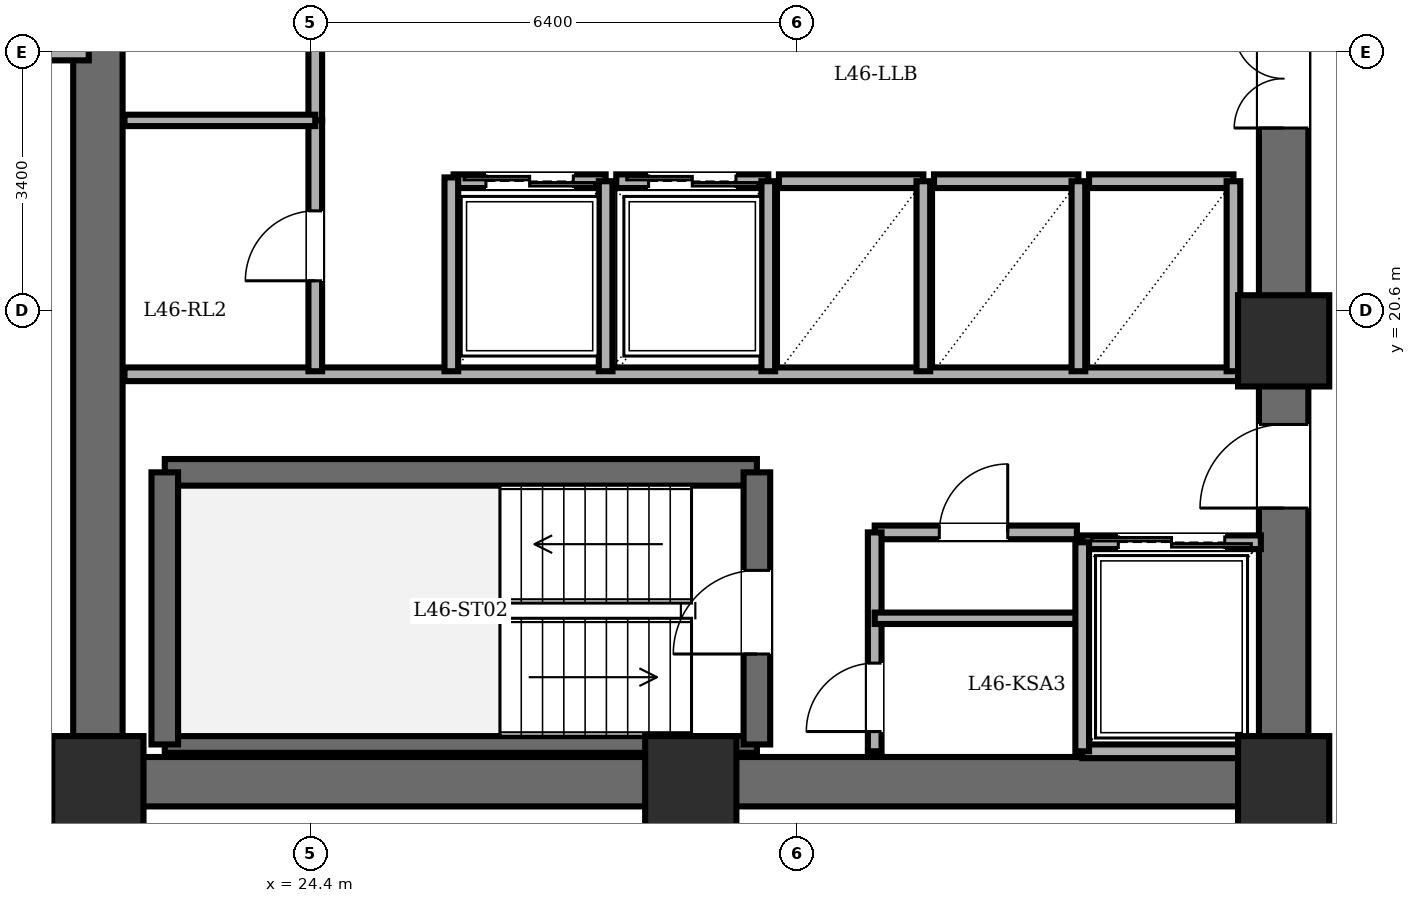
"""IFC4 building model, lengths in metres.
Left out: names, types, materials, properties, quantities, classifications, styles, units other than length and angle.
Written with IfcOpenShell. Run it as: python <this file> out.ifc"""

import sys

from ifc_helpers import new_model, si_unit, direction, frame, frame_2d, origin, origin_2d, place, context, subcontext, project, spatial, rectangle, extrude, element, fill, save


model = new_model("IFC4")
c1 = context("Model", 3, precision=1e-05, world=origin(), true_north=direction((0.0, 1.0)))
c2 = subcontext(c1, "Body", "Model", "MODEL_VIEW")
j1 = project(units=[si_unit("LENGTHUNIT", "METRE"), si_unit("PLANEANGLEUNIT", "RADIAN")], contexts=[c1])
p1 = place(None, origin())
s1 = spatial("IfcSite", under=j1, at=p1, CompositionType="ELEMENT")
p2 = place(p1, origin())
s2 = spatial("IfcBuilding", under=s1, at=p2, CompositionType="ELEMENT")
p3 = place(p2, frame((0.0, 0.0, 176.2)))
s3 = spatial("IfcBuildingStorey", under=s2, at=p3, CompositionType="ELEMENT", Elevation=176.2)
for number, where, z_axis, x_axis in (
    (1, (21.6, 14.4, 0.0), (0.0, 0.0, 1.0), (1.0, 0.0, 0.0)),
    (2, (29.4, 14.4, 0.0), (0.0, 0.0, 1.0), (1.0, 0.0, 0.0)),
    (3, (37.2, 14.4, 0.0), (0.0, 0.0, 1.0), (1.0, 0.0, 0.0)),
    (4, (37.2, 20.2, 0.0), (0.0, 0.0, 1.0), (1.0, 0.0, 0.0)),
):
    element("IfcColumn", number, at=place(p3, frame(where, z_axis=z_axis, x_axis=x_axis)), inside=s3, PredefinedType="COLUMN", context=c2, shape_type="SweptSolid", body=[
        extrude(rectangle(XDim=1.2, YDim=1.2, at=origin_2d()), origin(), (0.0, 0.0, 1.0), 3.6),
    ])
p4 = place(p3, frame((21.6, 14.4, 0.0), z_axis=(0.0, 0.0, 1.0), x_axis=(0.0, 1.0, 0.0)))
e5 = element("IfcWall", 5, at=p4, inside=s3, PredefinedType="SHEAR", context=c2, shape_type="SweptSolid", body=[
    extrude(rectangle(XDim=19.2, YDim=0.65, at=frame_2d((9.6, 0.0))), origin(), (0.0, 0.0, 1.0), 3.4),
])
p5 = place(p3, frame((37.2, 14.4, 0.0), z_axis=(0.0, 0.0, 1.0), x_axis=(-1.0, 0.0, 0.0)))
e6 = element("IfcWall", 6, at=p5, inside=s3, PredefinedType="SHEAR", context=c2, shape_type="SweptSolid", body=[
    extrude(rectangle(XDim=15.6, YDim=0.65, at=frame_2d((7.8, 0.0))), origin(), (0.0, 0.0, 1.0), 3.4),
])
p6 = place(p3, frame((37.2, 14.4, 0.0), z_axis=(0.0, 0.0, 1.0), x_axis=(0.0, 1.0, 0.0)))
e7 = element("IfcWall", 7, at=p6, inside=s3, PredefinedType="SHEAR", context=c2, shape_type="SweptSolid", body=[
    extrude(rectangle(XDim=19.2, YDim=0.65, at=frame_2d((9.6, 0.0))), origin(), (0.0, 0.0, 1.0), 3.4),
])
p7 = place(p6, frame((15.8, 0.0, 0.0)))
e8 = element("IfcOpeningElement", 8, at=p7, cuts=e7, PredefinedType="OPENING", context=c2, shape_type="SweptSolid", body=[
    extrude(rectangle(XDim=1.15, YDim=2.15, at=frame_2d((0.575, 1.075))), frame((0.0, 0.335, 0.0), z_axis=(0.0, -1.0, 0.0), x_axis=(1.0, 0.0, 0.0)), (0.0, 0.0, 1.0), 0.67),
])
p8 = place(p6, frame((3.6, 0.0, 0.0)))
e9 = element("IfcOpeningElement", 9, at=p8, cuts=e7, PredefinedType="OPENING", context=c2, shape_type="SweptSolid", body=[
    extrude(rectangle(XDim=1.1, YDim=2.15, at=frame_2d((0.55, 1.075))), frame((0.0, 0.335, 0.0), z_axis=(0.0, -1.0, 0.0), x_axis=(1.0, 0.0, 0.0)), (0.0, 0.0, 1.0), 0.67),
])
p9 = place(p6, frame((8.6, 0.0, 0.0)))
e10 = element("IfcOpeningElement", 10, at=p9, cuts=e7, PredefinedType="OPENING", context=c2, shape_type="SweptSolid", body=[
    extrude(rectangle(XDim=1.3, YDim=2.2, at=frame_2d((0.65, 1.1))), frame((0.0, 0.335, 0.0), z_axis=(0.0, -1.0, 0.0), x_axis=(1.0, 0.0, 0.0)), (0.0, 0.0, 1.0), 0.67),
])
p10 = place(p3, frame((22.48, 18.47, 0.0), z_axis=(0.0, 0.0, 1.0), x_axis=(1.0, 0.0, 0.0)))
e11 = element("IfcWall", 11, at=p10, inside=s3, PredefinedType="SOLIDWALL", context=c2, shape_type="SweptSolid", body=[
    extrude(rectangle(XDim=7.79, YDim=0.35, at=frame_2d((3.895, 0.0))), origin(), (0.0, 0.0, 1.0), 3.4),
])
p11 = place(p3, frame((22.48, 14.89, 0.0), z_axis=(0.0, 0.0, 1.0), x_axis=(1.0, 0.0, 0.0)))
e12 = element("IfcWall", 12, at=p11, inside=s3, PredefinedType="PARTITIONING", context=c2, shape_type="SweptSolid", body=[
    extrude(rectangle(XDim=7.79, YDim=0.22, at=frame_2d((3.895, 0.0))), origin(), (0.0, 0.0, 1.0), 3.4),
])
p12 = place(p3, frame((22.48, 14.89, 0.0), z_axis=(0.0, 0.0, 1.0), x_axis=(0.0, 1.0, 0.0)))
e13 = element("IfcWall", 13, at=p12, inside=s3, PredefinedType="SOLIDWALL", context=c2, shape_type="SweptSolid", body=[
    extrude(rectangle(XDim=3.58, YDim=0.35, at=frame_2d((1.79, 0.0))), origin(), (0.0, 0.0, 1.0), 3.4),
])
p13 = place(p3, frame((30.27, 14.89, 0.0), z_axis=(0.0, 0.0, 1.0), x_axis=(0.0, 1.0, 0.0)))
e14 = element("IfcWall", 14, at=p13, inside=s3, PredefinedType="SOLIDWALL", context=c2, shape_type="SweptSolid", body=[
    extrude(rectangle(XDim=3.58, YDim=0.35, at=frame_2d((1.79, 0.0))), origin(), (0.0, 0.0, 1.0), 3.4),
])
p14 = place(p13, frame((1.19, 0.0, 0.0)))
e15 = element("IfcOpeningElement", 15, at=p14, cuts=e14, PredefinedType="OPENING", context=c2, shape_type="SweptSolid", body=[
    extrude(rectangle(XDim=1.1, YDim=2.15, at=frame_2d((0.55, 1.075))), frame((0.0, 0.185, 0.0), z_axis=(0.0, -1.0, 0.0), x_axis=(1.0, 0.0, 0.0)), (0.0, 0.0, 1.0), 0.37),
])
p15 = place(p3, frame((21.95, 19.76, 0.0), z_axis=(0.0, 0.0, 1.0), x_axis=(1.0, 0.0, 0.0)))
e16 = element("IfcWall", 16, at=p15, inside=s3, PredefinedType="PARTITIONING", context=c2, shape_type="SweptSolid", body=[
    extrude(rectangle(XDim=14.87, YDim=0.18, at=frame_2d((7.435, 0.0))), origin(), (0.0, 0.0, 1.0), 3.4),
])
p16 = place(p3, frame((31.82, 17.68, 0.0), z_axis=(0.0, 0.0, 1.0), x_axis=(1.0, 0.0, 0.0)))
e17 = element("IfcWall", 17, at=p16, inside=s3, PredefinedType="PARTITIONING", context=c2, shape_type="SweptSolid", body=[
    extrude(rectangle(XDim=2.66, YDim=0.18, at=frame_2d((1.33, 0.0))), origin(), (0.0, 0.0, 1.0), 3.4),
])
p17 = place(p16, frame((0.85, 0.0, 0.0)))
e18 = element("IfcOpeningElement", 18, at=p17, cuts=e17, PredefinedType="OPENING", context=c2, shape_type="SweptSolid", body=[
    extrude(rectangle(XDim=0.9, YDim=2.05, at=frame_2d((0.45, 1.025))), frame((0.0, 0.1, 0.0), z_axis=(0.0, -1.0, 0.0), x_axis=(1.0, 0.0, 0.0)), (0.0, 0.0, 1.0), 0.2),
])
p18 = place(p3, frame((31.82, 14.8, 0.0), z_axis=(0.0, 0.0, 1.0), x_axis=(0.0, 1.0, 0.0)))
e19 = element("IfcWall", 19, at=p18, inside=s3, PredefinedType="PARTITIONING", context=c2, shape_type="SweptSolid", body=[
    extrude(rectangle(XDim=2.88, YDim=0.18, at=frame_2d((1.44, 0.0))), origin(), (0.0, 0.0, 1.0), 3.4),
])
p19 = place(p18, frame((0.26, 0.0, 0.0)))
e20 = element("IfcOpeningElement", 20, at=p19, cuts=e19, PredefinedType="OPENING", context=c2, shape_type="SweptSolid", body=[
    extrude(rectangle(XDim=0.9, YDim=2.05, at=frame_2d((0.45, 1.025))), frame((0.0, 0.1, 0.0), z_axis=(0.0, -1.0, 0.0), x_axis=(1.0, 0.0, 0.0)), (0.0, 0.0, 1.0), 0.2),
])
p20 = place(p3, frame((31.82, 16.55, 0.0), z_axis=(0.0, 0.0, 1.0), x_axis=(1.0, 0.0, 0.0)))
e21 = element("IfcWall", 21, at=p20, inside=s3, PredefinedType="PARTITIONING", context=c2, shape_type="SweptSolid", body=[
    extrude(rectangle(XDim=2.66, YDim=0.15, at=frame_2d((1.33, 0.0))), origin(), (0.0, 0.0, 1.0), 3.4),
])
p21 = place(p3, frame((34.55, 17.55, 0.0), z_axis=(0.0, 0.0, 1.0), x_axis=(1.0, 0.0, 0.0)))
e22 = element("IfcWall", 22, at=p21, inside=s3, PredefinedType="PARTITIONING", context=c2, shape_type="SweptSolid", body=[
    extrude(rectangle(XDim=2.35, YDim=0.18, at=frame_2d((1.175, 0.0))), origin(), (0.0, 0.0, 1.0), 3.4),
])
p22 = place(p21, frame((0.475, 0.0, 0.0)))
e23 = element("IfcOpeningElement", 23, at=p22, cuts=e22, PredefinedType="OPENING", context=c2, shape_type="SweptSolid", body=[
    extrude(rectangle(XDim=1.4, YDim=2.3, at=frame_2d((0.7, 1.15))), frame((0.0, 0.1, 0.0), z_axis=(0.0, -1.0, 0.0), x_axis=(1.0, 0.0, 0.0)), (0.0, 0.0, 1.0), 0.2),
])
p23 = place(p3, frame((36.9, 14.8, 0.0), z_axis=(0.0, 0.0, 1.0), x_axis=(-1.0, 0.0, 0.0)))
e24 = element("IfcWall", 24, at=p23, inside=s3, PredefinedType="PARTITIONING", context=c2, shape_type="SweptSolid", body=[
    extrude(rectangle(XDim=2.35, YDim=0.18, at=frame_2d((1.175, 0.0))), origin(), (0.0, 0.0, 1.0), 3.4),
])
p24 = place(p3, frame((34.55, 17.55, 0.0), z_axis=(0.0, 0.0, 1.0), x_axis=(0.0, -1.0, 0.0)))
e25 = element("IfcWall", 25, at=p24, inside=s3, PredefinedType="PARTITIONING", context=c2, shape_type="SweptSolid", body=[
    extrude(rectangle(XDim=2.75, YDim=0.18, at=frame_2d((1.375, 0.0))), origin(), (0.0, 0.0, 1.0), 3.4),
])
p25 = place(p3, frame((26.28, 22.3, 0.0), z_axis=(0.0, 0.0, 1.0), x_axis=(1.0, 0.0, 0.0)))
e26 = element("IfcWall", 26, at=p25, inside=s3, PredefinedType="PARTITIONING", context=c2, shape_type="SweptSolid", body=[
    extrude(rectangle(XDim=2.0, YDim=0.18, at=frame_2d((1.0, 0.0))), origin(), (0.0, 0.0, 1.0), 3.4),
])
p26 = place(p25, frame((0.425, 0.0, 0.0)))
e27 = element("IfcOpeningElement", 27, at=p26, cuts=e26, PredefinedType="OPENING", context=c2, shape_type="SweptSolid", body=[
    extrude(rectangle(XDim=1.15, YDim=2.2, at=frame_2d((0.575, 1.1))), frame((0.0, 0.1, 0.0), z_axis=(0.0, -1.0, 0.0), x_axis=(1.0, 0.0, 0.0)), (0.0, 0.0, 1.0), 0.2),
])
p27 = place(p3, frame((28.28, 19.8, 0.0), z_axis=(0.0, 0.0, 1.0), x_axis=(0.0, 1.0, 0.0)))
e28 = element("IfcWall", 28, at=p27, inside=s3, PredefinedType="PARTITIONING", context=c2, shape_type="SweptSolid", body=[
    extrude(rectangle(XDim=2.5, YDim=0.18, at=frame_2d((1.25, 0.0))), origin(), (0.0, 0.0, 1.0), 3.4),
])
p28 = place(p3, frame((28.42, 22.3, 0.0), z_axis=(0.0, 0.0, 1.0), x_axis=(1.0, 0.0, 0.0)))
e29 = element("IfcWall", 29, at=p28, inside=s3, PredefinedType="PARTITIONING", context=c2, shape_type="SweptSolid", body=[
    extrude(rectangle(XDim=2.0, YDim=0.18, at=frame_2d((1.0, 0.0))), origin(), (0.0, 0.0, 1.0), 3.4),
])
p29 = place(p28, frame((0.425, 0.0, 0.0)))
e30 = element("IfcOpeningElement", 30, at=p29, cuts=e29, PredefinedType="OPENING", context=c2, shape_type="SweptSolid", body=[
    extrude(rectangle(XDim=1.15, YDim=2.2, at=frame_2d((0.575, 1.1))), frame((0.0, 0.1, 0.0), z_axis=(0.0, -1.0, 0.0), x_axis=(1.0, 0.0, 0.0)), (0.0, 0.0, 1.0), 0.2),
])
p30 = place(p3, frame((30.42, 19.8, 0.0), z_axis=(0.0, 0.0, 1.0), x_axis=(0.0, 1.0, 0.0)))
e31 = element("IfcWall", 31, at=p30, inside=s3, PredefinedType="PARTITIONING", context=c2, shape_type="SweptSolid", body=[
    extrude(rectangle(XDim=2.5, YDim=0.18, at=frame_2d((1.25, 0.0))), origin(), (0.0, 0.0, 1.0), 3.4),
])
p31 = place(p3, frame((30.56, 22.3, 0.0), z_axis=(0.0, 0.0, 1.0), x_axis=(1.0, 0.0, 0.0)))
e32 = element("IfcWall", 32, at=p31, inside=s3, PredefinedType="PARTITIONING", context=c2, shape_type="SweptSolid", body=[
    extrude(rectangle(XDim=1.9, YDim=0.18, at=frame_2d((0.95, 0.0))), origin(), (0.0, 0.0, 1.0), 3.4),
])
p32 = place(p3, frame((32.46, 19.8, 0.0), z_axis=(0.0, 0.0, 1.0), x_axis=(0.0, 1.0, 0.0)))
e33 = element("IfcWall", 33, at=p32, inside=s3, PredefinedType="PARTITIONING", context=c2, shape_type="SweptSolid", body=[
    extrude(rectangle(XDim=2.5, YDim=0.18, at=frame_2d((1.25, 0.0))), origin(), (0.0, 0.0, 1.0), 3.4),
])
p33 = place(p3, frame((32.6, 22.3, 0.0), z_axis=(0.0, 0.0, 1.0), x_axis=(1.0, 0.0, 0.0)))
e34 = element("IfcWall", 34, at=p33, inside=s3, PredefinedType="PARTITIONING", context=c2, shape_type="SweptSolid", body=[
    extrude(rectangle(XDim=1.9, YDim=0.18, at=frame_2d((0.95, 0.0))), origin(), (0.0, 0.0, 1.0), 3.4),
])
p34 = place(p3, frame((34.5, 19.8, 0.0), z_axis=(0.0, 0.0, 1.0), x_axis=(0.0, 1.0, 0.0)))
e35 = element("IfcWall", 35, at=p34, inside=s3, PredefinedType="PARTITIONING", context=c2, shape_type="SweptSolid", body=[
    extrude(rectangle(XDim=2.5, YDim=0.18, at=frame_2d((1.25, 0.0))), origin(), (0.0, 0.0, 1.0), 3.4),
])
p35 = place(p3, frame((34.64, 22.3, 0.0), z_axis=(0.0, 0.0, 1.0), x_axis=(1.0, 0.0, 0.0)))
e36 = element("IfcWall", 36, at=p35, inside=s3, PredefinedType="PARTITIONING", context=c2, shape_type="SweptSolid", body=[
    extrude(rectangle(XDim=1.9, YDim=0.18, at=frame_2d((0.95, 0.0))), origin(), (0.0, 0.0, 1.0), 3.4),
])
p36 = place(p3, frame((36.54, 19.8, 0.0), z_axis=(0.0, 0.0, 1.0), x_axis=(0.0, 1.0, 0.0)))
e37 = element("IfcWall", 37, at=p36, inside=s3, PredefinedType="PARTITIONING", context=c2, shape_type="SweptSolid", body=[
    extrude(rectangle(XDim=2.5, YDim=0.18, at=frame_2d((1.25, 0.0))), origin(), (0.0, 0.0, 1.0), 3.4),
])
p37 = place(p3, frame((24.46, 23.1, 0.0), z_axis=(0.0, 0.0, 1.0), x_axis=(0.0, 1.0, 0.0)))
e38 = element("IfcWall", 38, at=p37, inside=s3, PredefinedType="PARTITIONING", context=c2, shape_type="SweptSolid", body=[
    extrude(rectangle(XDim=4.4, YDim=0.18, at=frame_2d((2.2, 0.0))), origin(), (0.0, 0.0, 1.0), 3.4),
])
p38 = place(p37, frame((1.74, 0.0, 0.0)))
e39 = element("IfcOpeningElement", 39, at=p38, cuts=e38, PredefinedType="OPENING", context=c2, shape_type="SweptSolid", body=[
    extrude(rectangle(XDim=0.92, YDim=2.1, at=frame_2d((0.46, 1.05))), frame((0.0, 0.1, 0.0), z_axis=(0.0, -1.0, 0.0), x_axis=(1.0, 0.0, 0.0)), (0.0, 0.0, 1.0), 0.2),
])
p39 = place(p3, frame((24.46, 19.8, 0.0), z_axis=(0.0, 0.0, 1.0), x_axis=(0.0, 1.0, 0.0)))
e40 = element("IfcWall", 40, at=p39, inside=s3, PredefinedType="PARTITIONING", context=c2, shape_type="SweptSolid", body=[
    extrude(rectangle(XDim=3.3, YDim=0.18, at=frame_2d((1.65, 0.0))), origin(), (0.0, 0.0, 1.0), 3.4),
])
p40 = place(p39, frame((1.19, 0.0, 0.0)))
e41 = element("IfcOpeningElement", 41, at=p40, cuts=e40, PredefinedType="OPENING", context=c2, shape_type="SweptSolid", body=[
    extrude(rectangle(XDim=0.92, YDim=2.1, at=frame_2d((0.46, 1.05))), frame((0.0, 0.1, 0.0), z_axis=(0.0, -1.0, 0.0), x_axis=(1.0, 0.0, 0.0)), (0.0, 0.0, 1.0), 0.2),
])
p41 = place(p3, frame((21.95, 23.1, 0.0), z_axis=(0.0, 0.0, 1.0), x_axis=(1.0, 0.0, 0.0)))
e42 = element("IfcWall", 42, at=p41, inside=s3, PredefinedType="PARTITIONING", context=c2, shape_type="SweptSolid", body=[
    extrude(rectangle(XDim=2.51, YDim=0.15, at=frame_2d((1.255, 0.0))), origin(), (0.0, 0.0, 1.0), 3.4),
])
p42 = place(p3, frame((26.25, 19.8, 0.0), z_axis=(0.0, 0.0, 1.0), x_axis=(0.0, 1.0, 0.0)))
e43 = element("IfcWall", 43, at=p42, inside=s3, PredefinedType="PARTITIONING", context=c2, shape_type="SweptSolid", body=[
    extrude(rectangle(XDim=2.55, YDim=0.18, at=frame_2d((1.275, 0.0))), origin(), (0.0, 0.0, 1.0), 3.4),
])
p43 = place(p3, frame((13.8, 14.18, 0.0), z_axis=(0.0, 0.0, 1.0), x_axis=(1.0, 0.0, 0.0)))
e44 = element("IfcWall", 44, at=p43, inside=s3, PredefinedType="PARTITIONING", context=c2, shape_type="SweptSolid", body=[
    extrude(rectangle(XDim=7.68, YDim=0.22, at=frame_2d((3.84, 0.0))), origin(), (0.0, 0.0, 1.0), 3.4),
])
p44 = place(p43, frame((3.68, 0.0, 0.0)))
e45 = element("IfcOpeningElement", 45, at=p44, cuts=e44, PredefinedType="OPENING", context=c2, shape_type="SweptSolid", body=[
    extrude(rectangle(XDim=1.0, YDim=2.15, at=frame_2d((0.5, 1.075))), frame((0.0, 0.12, 0.0), z_axis=(0.0, -1.0, 0.0), x_axis=(1.0, 0.0, 0.0)), (0.0, 0.0, 1.0), 0.24),
])
p45 = place(p3, frame((13.8, 24.0, 0.0), z_axis=(0.0, 0.0, 1.0), x_axis=(1.0, 0.0, 0.0)))
e46 = element("IfcWall", 46, at=p45, inside=s3, PredefinedType="PARTITIONING", context=c2, shape_type="SweptSolid", body=[
    extrude(rectangle(XDim=7.68, YDim=0.22, at=frame_2d((3.84, 0.0))), origin(), (0.0, 0.0, 1.0), 3.4),
])
p46 = place(p14, origin())
e47 = element("IfcDoor", 47, at=p46, inside=s3, OperationType="SINGLE_SWING_LEFT", PredefinedType="DOOR", context=c2, shape_type="SweptSolid", body=[
    extrude(rectangle(XDim=1.1, YDim=2.15, at=frame_2d((0.55, 1.075))), frame((0.0, 0.025, 0.0), z_axis=(0.0, -1.0, 0.0), x_axis=(1.0, 0.0, 0.0)), (0.0, 0.0, 1.0), 0.05),
])
fill(e15, e47)
p47 = place(p8, origin())
e48 = element("IfcDoor", 48, at=p47, inside=s3, OperationType="SINGLE_SWING_LEFT", PredefinedType="DOOR", context=c2, shape_type="SweptSolid", body=[
    extrude(rectangle(XDim=1.1, YDim=2.15, at=frame_2d((0.55, 1.075))), frame((0.0, 0.025, 0.0), z_axis=(0.0, -1.0, 0.0), x_axis=(1.0, 0.0, 0.0)), (0.0, 0.0, 1.0), 0.05),
])
fill(e9, e48)
p48 = place(p17, origin())
e49 = element("IfcDoor", 49, at=p48, inside=s3, OperationType="SINGLE_SWING_RIGHT", PredefinedType="DOOR", context=c2, shape_type="SweptSolid", body=[
    extrude(rectangle(XDim=0.9, YDim=2.05, at=frame_2d((0.45, 1.025))), frame((0.0, 0.025, 0.0), z_axis=(0.0, -1.0, 0.0), x_axis=(1.0, 0.0, 0.0)), (0.0, 0.0, 1.0), 0.05),
])
fill(e18, e49)
p49 = place(p19, origin())
e50 = element("IfcDoor", 50, at=p49, inside=s3, OperationType="SINGLE_SWING_LEFT", PredefinedType="DOOR", context=c2, shape_type="SweptSolid", body=[
    extrude(rectangle(XDim=0.9, YDim=2.05, at=frame_2d((0.45, 1.025))), frame((0.0, 0.025, 0.0), z_axis=(0.0, -1.0, 0.0), x_axis=(1.0, 0.0, 0.0)), (0.0, 0.0, 1.0), 0.05),
])
fill(e20, e50)
p50 = place(p22, origin())
e51 = element("IfcDoor", 51, at=p50, inside=s3, OperationType="DOUBLE_DOOR_SLIDING", PredefinedType="DOOR", context=c2, shape_type="SweptSolid", body=[
    extrude(rectangle(XDim=1.4, YDim=2.3, at=frame_2d((0.7, 1.15))), frame((0.0, 0.025, 0.0), z_axis=(0.0, -1.0, 0.0), x_axis=(1.0, 0.0, 0.0)), (0.0, 0.0, 1.0), 0.05),
])
fill(e23, e51)
p51 = place(p26, origin())
e52 = element("IfcDoor", 52, at=p51, inside=s3, OperationType="DOUBLE_DOOR_SLIDING", PredefinedType="DOOR", context=c2, shape_type="SweptSolid", body=[
    extrude(rectangle(XDim=1.15, YDim=2.2, at=frame_2d((0.575, 1.1))), frame((0.0, 0.025, 0.0), z_axis=(0.0, -1.0, 0.0), x_axis=(1.0, 0.0, 0.0)), (0.0, 0.0, 1.0), 0.05),
])
fill(e27, e52)
p52 = place(p29, origin())
e53 = element("IfcDoor", 53, at=p52, inside=s3, OperationType="DOUBLE_DOOR_SLIDING", PredefinedType="DOOR", context=c2, shape_type="SweptSolid", body=[
    extrude(rectangle(XDim=1.15, YDim=2.2, at=frame_2d((0.575, 1.1))), frame((0.0, 0.025, 0.0), z_axis=(0.0, -1.0, 0.0), x_axis=(1.0, 0.0, 0.0)), (0.0, 0.0, 1.0), 0.05),
])
fill(e30, e53)
p53 = place(p40, origin())
e54 = element("IfcDoor", 54, at=p53, inside=s3, OperationType="SINGLE_SWING_LEFT", PredefinedType="DOOR", context=c2, shape_type="SweptSolid", body=[
    extrude(rectangle(XDim=0.92, YDim=2.1, at=frame_2d((0.46, 1.05))), frame((0.0, 0.025, 0.0), z_axis=(0.0, -1.0, 0.0), x_axis=(1.0, 0.0, 0.0)), (0.0, 0.0, 1.0), 0.05),
])
fill(e41, e54)
p54 = place(p9, origin())
e55 = element("IfcDoor", 55, at=p54, inside=s3, OperationType="DOUBLE_DOOR_SINGLE_SWING", PredefinedType="DOOR", context=c2, shape_type="SweptSolid", body=[
    extrude(rectangle(XDim=1.3, YDim=2.2, at=frame_2d((0.65, 1.1))), frame((0.0, 0.025, 0.0), z_axis=(0.0, -1.0, 0.0), x_axis=(1.0, 0.0, 0.0)), (0.0, 0.0, 1.0), 0.05),
])
fill(e10, e55)
save(model, sys.argv[1])
